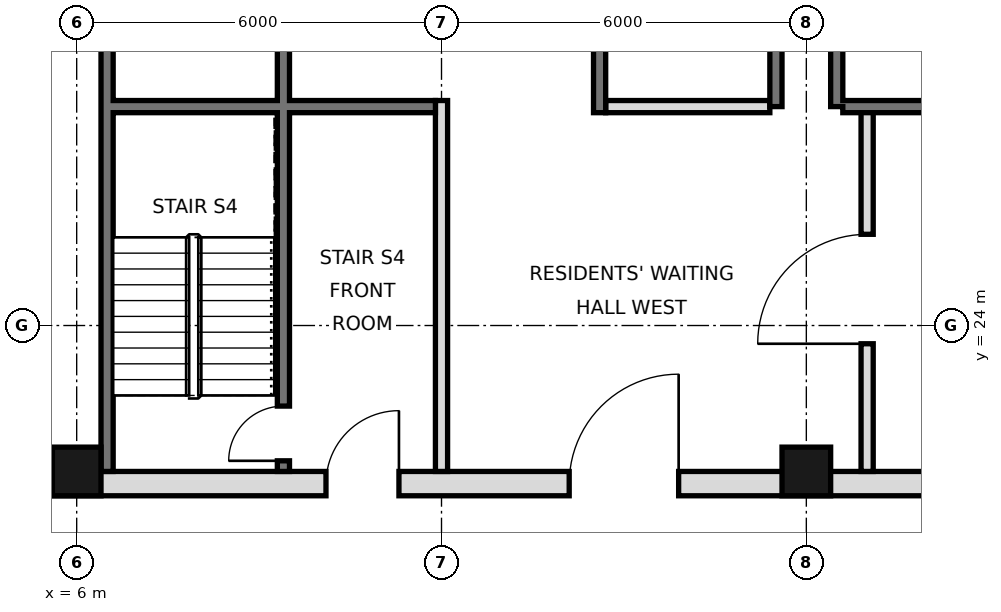
"""IFC4 building model, lengths in metres.
Left out: names, types, materials, properties, quantities, classifications, styles, units other than length and angle.
Written with IfcOpenShell. Run it as: python <this file> out.ifc"""

import sys

from ifc_helpers import new_model, si_unit, direction, frame, frame_2d, origin, origin_2d, place, context, subcontext, project, spatial, rectangle, hollow_rectangle, extrude, element, fill, save


model = new_model("IFC4")
c1 = context("Model", 3, precision=1e-05, world=origin(), true_north=direction((0.0, 1.0)))
c2 = subcontext(c1, "Body", "Model", "MODEL_VIEW")
j1 = project(units=[si_unit("LENGTHUNIT", "METRE"), si_unit("PLANEANGLEUNIT", "RADIAN")], contexts=[c1])
p1 = place(None, origin())
s1 = spatial("IfcSite", under=j1, at=p1, CompositionType="ELEMENT")
p2 = place(p1, origin())
s2 = spatial("IfcBuilding", under=s1, at=p2, CompositionType="ELEMENT")
p3 = place(p2, frame((0.0, 0.0, 215.4)))
s3 = spatial("IfcBuildingStorey", under=s2, at=p3, CompositionType="ELEMENT", Elevation=215.4)
for number, where, z_axis, x_axis in (
    (1, (6.0, 21.6, 0.0), (0.0, 0.0, 1.0), (1.0, 0.0, 0.0)),
    (2, (18.0, 21.6, 0.0), (0.0, 0.0, 1.0), (1.0, 0.0, 0.0)),
):
    element("IfcColumn", number, at=place(p3, frame(where, z_axis=z_axis, x_axis=x_axis)), inside=s3, PredefinedType="COLUMN", context=c2, shape_type="SweptSolid", body=[
        extrude(hollow_rectangle(XDim=0.8, YDim=0.8, WallThickness=0.04, at=origin_2d()), origin(), (0.0, 0.0, 1.0), 3.6),
    ])
p4 = place(p3, frame((6.5, 21.6, 0.0), z_axis=(0.0, 0.0, 1.0), x_axis=(0.0, 1.0, 0.0)))
e3 = element("IfcWall", 3, at=p4, inside=s3, PredefinedType="SOLIDWALL", context=c2, shape_type="SweptSolid", body=[
    extrude(rectangle(XDim=23.5, YDim=0.2, at=frame_2d((11.75, 0.0))), origin(), (0.0, 0.0, 1.0), 3.42),
])
for number, where, z_axis, x_axis in (
    (4, (17.5, 27.6, 0.0), (0.0, 0.0, 1.0), (0.0, 1.0, 0.0)),
    (5, (18.5, 27.6, 0.0), (0.0, 0.0, 1.0), (0.0, 1.0, 0.0)),
):
    element("IfcWall", number, at=place(p3, frame(where, z_axis=z_axis, x_axis=x_axis)), inside=s3, PredefinedType="SOLIDWALL", context=c2, shape_type="SweptSolid", body=[
        extrude(rectangle(XDim=17.5, YDim=0.2, at=frame_2d((8.75, 0.0))), origin(), (0.0, 0.0, 1.0), 3.42),
    ])
p5 = place(p3, frame((5.6, 21.4, 0.0), z_axis=(0.0, 0.0, 1.0), x_axis=(1.0, 0.0, 0.0)))
e6 = element("IfcWall", 6, at=p5, inside=s3, PredefinedType="SOLIDWALL", context=c2, shape_type="SweptSolid", body=[
    extrude(rectangle(XDim=36.8, YDim=0.4, at=frame_2d((18.4, 0.0))), origin(), (0.0, 0.0, 1.0), 3.42),
])
p6 = place(p5, frame((8.5, 0.0, 0.0)))
e7 = element("IfcOpeningElement", 7, at=p6, cuts=e6, PredefinedType="OPENING", context=c2, shape_type="SweptSolid", body=[
    extrude(rectangle(XDim=1.8, YDim=2.1, at=frame_2d((0.9, 1.05))), frame((0.0, 0.21, 0.0), z_axis=(0.0, -1.0, 0.0), x_axis=(1.0, 0.0, 0.0)), (0.0, 0.0, 1.0), 0.42),
])
p7 = place(p5, frame((17.5, 0.0, 0.0)))
e8 = element("IfcOpeningElement", 8, at=p7, cuts=e6, PredefinedType="OPENING", context=c2, shape_type="SweptSolid", body=[
    extrude(rectangle(XDim=1.8, YDim=2.1, at=frame_2d((0.9, 1.05))), frame((0.0, 0.21, 0.0), z_axis=(0.0, -1.0, 0.0), x_axis=(1.0, 0.0, 0.0)), (0.0, 0.0, 1.0), 0.42),
])
p8 = place(p5, frame((26.5, 0.0, 0.0)))
e9 = element("IfcOpeningElement", 9, at=p8, cuts=e6, PredefinedType="OPENING", context=c2, shape_type="SweptSolid", body=[
    extrude(rectangle(XDim=1.8, YDim=2.1, at=frame_2d((0.9, 1.05))), frame((0.0, 0.21, 0.0), z_axis=(0.0, -1.0, 0.0), x_axis=(1.0, 0.0, 0.0)), (0.0, 0.0, 1.0), 0.42),
])
p9 = place(p5, frame((4.5, 0.0, 0.0)))
e10 = element("IfcOpeningElement", 10, at=p9, cuts=e6, PredefinedType="OPENING", context=c2, shape_type="SweptSolid", body=[
    extrude(rectangle(XDim=1.2, YDim=2.1, at=frame_2d((0.6, 1.05))), frame((0.0, 0.21, 0.0), z_axis=(0.0, -1.0, 0.0), x_axis=(1.0, 0.0, 0.0)), (0.0, 0.0, 1.0), 0.42),
])
p10 = place(p5, frame((31.1, 0.0, 0.0)))
e11 = element("IfcOpeningElement", 11, at=p10, cuts=e6, PredefinedType="OPENING", context=c2, shape_type="SweptSolid", body=[
    extrude(rectangle(XDim=1.2, YDim=2.1, at=frame_2d((0.6, 1.05))), frame((0.0, 0.21, 0.0), z_axis=(0.0, -1.0, 0.0), x_axis=(1.0, 0.0, 0.0)), (0.0, 0.0, 1.0), 0.42),
])
p11 = place(p3, frame((19.0, 21.6, 0.0), z_axis=(0.0, 0.0, 1.0), x_axis=(0.0, 1.0, 0.0)))
e12 = element("IfcWall", 12, at=p11, inside=s3, PredefinedType="PARTITIONING", context=c2, shape_type="SweptSolid", body=[
    extrude(rectangle(XDim=6.0, YDim=0.2, at=frame_2d((3.0, 0.0))), origin(), (0.0, 0.0, 1.0), 3.42),
])
p12 = place(p11, frame((2.1, 0.0, 0.0)))
e13 = element("IfcOpeningElement", 13, at=p12, cuts=e12, PredefinedType="OPENING", context=c2, shape_type="SweptSolid", body=[
    extrude(rectangle(XDim=1.8, YDim=2.1, at=frame_2d((0.9, 1.05))), frame((0.0, 0.11, 0.0), z_axis=(0.0, -1.0, 0.0), x_axis=(1.0, 0.0, 0.0)), (0.0, 0.0, 1.0), 0.22),
])
p13 = place(p3, frame((12.0, 21.6, 0.0), z_axis=(0.0, 0.0, 1.0), x_axis=(0.0, 1.0, 0.0)))
e14 = element("IfcWall", 14, at=p13, inside=s3, PredefinedType="PARTITIONING", context=c2, shape_type="SweptSolid", body=[
    extrude(rectangle(XDim=6.1, YDim=0.2, at=frame_2d((3.05, 0.0))), origin(), (0.0, 0.0, 1.0), 3.42),
])
p14 = place(p3, frame((14.6, 27.5, 0.0), z_axis=(0.0, 0.0, 1.0), x_axis=(0.0, 1.0, 0.0)))
e15 = element("IfcWall", 15, at=p14, inside=s3, PredefinedType="SOLIDWALL", context=c2, shape_type="SweptSolid", body=[
    extrude(rectangle(XDim=17.5, YDim=0.2, at=frame_2d((8.75, 0.0))), origin(), (0.0, 0.0, 1.0), 3.42),
])
p15 = place(p14, frame((15.4, 0.0, 0.0)))
e16 = element("IfcOpeningElement", 16, at=p15, cuts=e15, PredefinedType="OPENING", context=c2, shape_type="SweptSolid", body=[
    extrude(rectangle(XDim=1.1, YDim=2.1, at=frame_2d((0.55, 1.05))), frame((0.0, 0.11, 0.0), z_axis=(0.0, -1.0, 0.0), x_axis=(1.0, 0.0, 0.0)), (0.0, 0.0, 1.0), 0.22),
])
p16 = place(p14, frame((2.7, 0.0, 0.0)))
e17 = element("IfcOpeningElement", 17, at=p16, cuts=e15, PredefinedType="OPENING", context=c2, shape_type="SweptSolid", body=[
    extrude(rectangle(XDim=1.0, YDim=2.1, at=frame_2d((0.5, 1.05))), frame((0.0, 0.11, 0.0), z_axis=(0.0, -1.0, 0.0), x_axis=(1.0, 0.0, 0.0)), (0.0, 0.0, 1.0), 0.22),
])
p17 = place(p14, frame((9.9, 0.0, 0.0)))
e18 = element("IfcOpeningElement", 18, at=p17, cuts=e15, PredefinedType="OPENING", context=c2, shape_type="SweptSolid", body=[
    extrude(rectangle(XDim=0.9, YDim=2.1, at=frame_2d((0.45, 1.05))), frame((0.0, 0.11, 0.0), z_axis=(0.0, -1.0, 0.0), x_axis=(1.0, 0.0, 0.0)), (0.0, 0.0, 1.0), 0.22),
])
p18 = place(p3, frame((9.4, 21.6, 0.0), z_axis=(0.0, 0.0, 1.0), x_axis=(0.0, 1.0, 0.0)))
e19 = element("IfcWall", 19, at=p18, inside=s3, PredefinedType="SOLIDWALL", context=c2, shape_type="SweptSolid", body=[
    extrude(rectangle(XDim=23.4, YDim=0.2, at=frame_2d((11.7, 0.0))), origin(), (0.0, 0.0, 1.0), 3.42),
])
p19 = place(p18, frame((7.95, 0.0, 0.0)))
e20 = element("IfcOpeningElement", 20, at=p19, cuts=e19, PredefinedType="OPENING", context=c2, shape_type="SweptSolid", body=[
    extrude(rectangle(XDim=1.0, YDim=2.1, at=frame_2d((0.5, 1.05))), frame((0.0, 0.11, 0.0), z_axis=(0.0, -1.0, 0.0), x_axis=(1.0, 0.0, 0.0)), (0.0, 0.0, 1.0), 0.22),
])
p20 = place(p18, frame((12.6, 0.0, 0.0)))
e21 = element("IfcOpeningElement", 21, at=p20, cuts=e19, PredefinedType="OPENING", context=c2, shape_type="SweptSolid", body=[
    extrude(rectangle(XDim=1.0, YDim=2.1, at=frame_2d((0.5, 1.05))), frame((0.0, 0.11, 0.0), z_axis=(0.0, -1.0, 0.0), x_axis=(1.0, 0.0, 0.0)), (0.0, 0.0, 1.0), 0.22),
])
p21 = place(p18, frame((22.1, 0.0, 0.0)))
e22 = element("IfcOpeningElement", 22, at=p21, cuts=e19, PredefinedType="OPENING", context=c2, shape_type="SweptSolid", body=[
    extrude(rectangle(XDim=1.0, YDim=2.1, at=frame_2d((0.5, 1.05))), frame((0.0, 0.11, 0.0), z_axis=(0.0, -1.0, 0.0), x_axis=(1.0, 0.0, 0.0)), (0.0, 0.0, 1.0), 0.22),
])
p22 = place(p18, frame((0.175, 0.0, 0.0)))
e23 = element("IfcOpeningElement", 23, at=p22, cuts=e19, PredefinedType="OPENING", context=c2, shape_type="SweptSolid", body=[
    extrude(rectangle(XDim=0.9, YDim=2.1, at=frame_2d((0.45, 1.05))), frame((0.0, 0.11, 0.0), z_axis=(0.0, -1.0, 0.0), x_axis=(1.0, 0.0, 0.0)), (0.0, 0.0, 1.0), 0.22),
])
p23 = place(p3, frame((14.7, 27.6, 0.0), z_axis=(0.0, 0.0, 1.0), x_axis=(1.0, 0.0, 0.0)))
e24 = element("IfcWall", 24, at=p23, inside=s3, PredefinedType="PARTITIONING", context=c2, shape_type="SweptSolid", body=[
    extrude(rectangle(XDim=2.7, YDim=0.2, at=frame_2d((1.35, 0.0))), origin(), (0.0, 0.0, 1.0), 3.42),
])
p24 = place(p3, frame((18.6, 27.6, 0.0), z_axis=(0.0, 0.0, 1.0), x_axis=(1.0, 0.0, 0.0)))
e25 = element("IfcWall", 25, at=p24, inside=s3, PredefinedType="SOLIDWALL", context=c2, shape_type="SweptSolid", body=[
    extrude(rectangle(XDim=2.7, YDim=0.2, at=frame_2d((1.35, 0.0))), origin(), (0.0, 0.0, 1.0), 3.42),
])
p25 = place(p3, frame((6.6, 27.6, 0.0), z_axis=(0.0, 0.0, 1.0), x_axis=(1.0, 0.0, 0.0)))
e26 = element("IfcWall", 26, at=p25, inside=s3, PredefinedType="SOLIDWALL", context=c2, shape_type="SweptSolid", body=[
    extrude(rectangle(XDim=5.3, YDim=0.2, at=frame_2d((2.65, 0.0))), origin(), (0.0, 0.0, 1.0), 3.42),
])
p26 = place(p6, frame((1.8, 0.0, 0.0), z_axis=(0.0, 0.0, 1.0), x_axis=(-1.0, 0.0, 0.0)))
e27 = element("IfcDoor", 27, at=p26, inside=s3, OperationType="SINGLE_SWING_LEFT", PredefinedType="DOOR", context=c2, shape_type="SweptSolid", body=[
    extrude(rectangle(XDim=1.8, YDim=2.1, at=frame_2d((0.9, 1.05))), frame((0.0, 0.025, 0.0), z_axis=(0.0, -1.0, 0.0), x_axis=(1.0, 0.0, 0.0)), (0.0, 0.0, 1.0), 0.05),
])
fill(e7, e27)
p27 = place(p12, origin())
e28 = element("IfcDoor", 28, at=p27, inside=s3, OperationType="SINGLE_SWING_LEFT", PredefinedType="DOOR", context=c2, shape_type="SweptSolid", body=[
    extrude(rectangle(XDim=1.8, YDim=2.1, at=frame_2d((0.9, 1.05))), frame((0.0, 0.025, 0.0), z_axis=(0.0, -1.0, 0.0), x_axis=(1.0, 0.0, 0.0)), (0.0, 0.0, 1.0), 0.05),
])
fill(e13, e28)
p28 = place(p9, frame((1.2, 0.0, 0.0), z_axis=(0.0, 0.0, 1.0), x_axis=(-1.0, 0.0, 0.0)))
e29 = element("IfcDoor", 29, at=p28, inside=s3, OperationType="SINGLE_SWING_LEFT", PredefinedType="DOOR", context=c2, shape_type="SweptSolid", body=[
    extrude(rectangle(XDim=1.2, YDim=2.1, at=frame_2d((0.6, 1.05))), frame((0.0, 0.025, 0.0), z_axis=(0.0, -1.0, 0.0), x_axis=(1.0, 0.0, 0.0)), (0.0, 0.0, 1.0), 0.05),
])
fill(e10, e29)
p29 = place(p22, origin())
e30 = element("IfcDoor", 30, at=p29, inside=s3, OperationType="SINGLE_SWING_LEFT", PredefinedType="DOOR", context=c2, shape_type="SweptSolid", body=[
    extrude(rectangle(XDim=0.9, YDim=2.1, at=frame_2d((0.45, 1.05))), frame((0.0, 0.025, 0.0), z_axis=(0.0, -1.0, 0.0), x_axis=(1.0, 0.0, 0.0)), (0.0, 0.0, 1.0), 0.05),
])
fill(e23, e30)
save(model, sys.argv[1])
